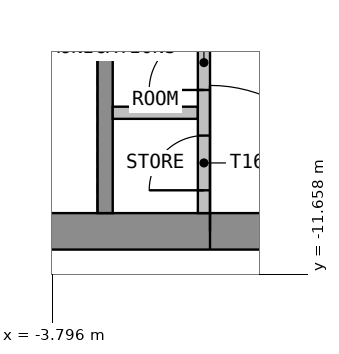
"""IFC4 building model, lengths in metres.
Left out: names, types, materials, properties, quantities, classifications, styles, units other than length and angle.
Written with IfcOpenShell. Run it as: python <this file> out.ifc"""

import sys

from ifc_helpers import new_model, si_unit, direction, frame, frame_2d, origin, place, context, subcontext, project, spatial, rectangle, extrude, element, fill, save


model = new_model("IFC4")
c1 = context("Model", 3, precision=1e-05, world=origin(), true_north=direction((0.0, 1.0)))
c2 = subcontext(c1, "Body", "Model", "MODEL_VIEW")
j1 = project(units=[si_unit("LENGTHUNIT", "METRE"), si_unit("PLANEANGLEUNIT", "RADIAN")], contexts=[c1])
p1 = place(None, origin())
s1 = spatial("IfcSite", under=j1, at=p1, CompositionType="ELEMENT")
p2 = place(p1, origin())
s2 = spatial("IfcBuilding", under=s1, at=p2, CompositionType="ELEMENT")
p3 = place(p2, frame((0.0, 0.0, 219.0)))
s3 = spatial("IfcBuildingStorey", under=s2, at=p3, CompositionType="ELEMENT", Elevation=219.0)
p4 = place(p3, frame((-13.5, -10.95, 0.0), z_axis=(0.0, 0.0, 1.0), x_axis=(1.0, 0.0, 0.0)))
e1 = element("IfcWall", 1, at=p4, inside=s3, PredefinedType="SHEAR", context=c2, shape_type="SweptSolid", body=[
    extrude(rectangle(XDim=27.0, YDim=0.6, at=frame_2d((13.5, 0.0))), origin(), (0.0, 0.0, 1.0), 3.55),
])
p5 = place(p4, frame((12.3, 0.0, 0.0)))
e2 = element("IfcOpeningElement", 2, at=p5, cuts=e1, PredefinedType="OPENING", context=c2, shape_type="SweptSolid", body=[
    extrude(rectangle(XDim=2.4, YDim=2.1, at=frame_2d((1.2, 1.05))), frame((0.0, 0.31, 0.0), z_axis=(0.0, -1.0, 0.0), x_axis=(1.0, 0.0, 0.0)), (0.0, 0.0, 1.0), 0.62),
])
p6 = place(p4, frame((1.05, 0.0, 0.0)))
e3 = element("IfcOpeningElement", 3, at=p6, cuts=e1, PredefinedType="OPENING", context=c2, shape_type="SweptSolid", body=[
    extrude(rectangle(XDim=1.2, YDim=2.1, at=frame_2d((0.6, 1.05))), frame((0.0, 0.31, 0.0), z_axis=(0.0, -1.0, 0.0), x_axis=(1.0, 0.0, 0.0)), (0.0, 0.0, 1.0), 0.62),
])
p7 = place(p4, frame((24.75, 0.0, 0.0)))
e4 = element("IfcOpeningElement", 4, at=p7, cuts=e1, PredefinedType="OPENING", context=c2, shape_type="SweptSolid", body=[
    extrude(rectangle(XDim=1.2, YDim=2.1, at=frame_2d((0.6, 1.05))), frame((0.0, 0.31, 0.0), z_axis=(0.0, -1.0, 0.0), x_axis=(1.0, 0.0, 0.0)), (0.0, 0.0, 1.0), 0.62),
])
p8 = place(p3, frame((-2.925, -10.65, 0.0), z_axis=(0.0, 0.0, 1.0), x_axis=(0.0, 1.0, 0.0)))
e5 = element("IfcWall", 5, at=p8, inside=s3, PredefinedType="SHEAR", context=c2, shape_type="SweptSolid", body=[
    extrude(rectangle(XDim=3.25, YDim=0.25, at=frame_2d((1.625, 0.0))), origin(), (0.0, 0.0, 1.0), 3.55),
])
p9 = place(p3, frame((-2.8, -9.0, 0.0), z_axis=(0.0, 0.0, 1.0), x_axis=(1.0, 0.0, 0.0)))
e6 = element("IfcWall", 6, at=p9, inside=s3, PredefinedType="PARTITIONING", context=c2, shape_type="SweptSolid", body=[
    extrude(rectangle(XDim=1.4, YDim=0.2, at=frame_2d((0.7, 0.0))), origin(), (0.0, 0.0, 1.0), 3.55),
])
p10 = place(p3, frame((-1.3, -10.65, 0.0), z_axis=(0.0, 0.0, 1.0), x_axis=(0.0, 1.0, 0.0)))
e7 = element("IfcWall", 7, at=p10, inside=s3, PredefinedType="PARTITIONING", context=c2, shape_type="SweptSolid", body=[
    extrude(rectangle(XDim=3.5, YDim=0.2, at=frame_2d((1.75, 0.0))), origin(), (0.0, 0.0, 1.0), 3.55),
])
p11 = place(p10, frame((0.375, 0.0, 0.0)))
e8 = element("IfcOpeningElement", 8, at=p11, cuts=e7, PredefinedType="OPENING", context=c2, shape_type="SweptSolid", body=[
    extrude(rectangle(XDim=0.9, YDim=2.1, at=frame_2d((0.45, 1.05))), frame((0.0, 0.11, 0.0), z_axis=(0.0, -1.0, 0.0), x_axis=(1.0, 0.0, 0.0)), (0.0, 0.0, 1.0), 0.22),
])
p12 = place(p10, frame((2.025, 0.0, 0.0)))
e9 = element("IfcOpeningElement", 9, at=p12, cuts=e7, PredefinedType="OPENING", context=c2, shape_type="SweptSolid", body=[
    extrude(rectangle(XDim=0.9, YDim=2.1, at=frame_2d((0.45, 1.05))), frame((0.0, 0.11, 0.0), z_axis=(0.0, -1.0, 0.0), x_axis=(1.0, 0.0, 0.0)), (0.0, 0.0, 1.0), 0.22),
])
p13 = place(p5, origin())
e10 = element("IfcDoor", 10, at=p13, inside=s3, OperationType="DOUBLE_DOOR_DOUBLE_SWING", PredefinedType="DOOR", context=c2, shape_type="SweptSolid", body=[
    extrude(rectangle(XDim=2.4, YDim=2.1, at=frame_2d((1.2, 1.05))), frame((0.0, 0.025, 0.0), z_axis=(0.0, -1.0, 0.0), x_axis=(1.0, 0.0, 0.0)), (0.0, 0.0, 1.0), 0.05),
])
fill(e2, e10)
p14 = place(p11, origin())
e11 = element("IfcDoor", 11, at=p14, inside=s3, OperationType="SINGLE_SWING_LEFT", PredefinedType="DOOR", context=c2, shape_type="SweptSolid", body=[
    extrude(rectangle(XDim=0.9, YDim=2.1, at=frame_2d((0.45, 1.05))), frame((0.0, 0.025, 0.0), z_axis=(0.0, -1.0, 0.0), x_axis=(1.0, 0.0, 0.0)), (0.0, 0.0, 1.0), 0.05),
])
fill(e8, e11)
p15 = place(p12, origin())
e12 = element("IfcDoor", 12, at=p15, inside=s3, OperationType="SINGLE_SWING_LEFT", PredefinedType="DOOR", context=c2, shape_type="SweptSolid", body=[
    extrude(rectangle(XDim=0.9, YDim=2.1, at=frame_2d((0.45, 1.05))), frame((0.0, 0.025, 0.0), z_axis=(0.0, -1.0, 0.0), x_axis=(1.0, 0.0, 0.0)), (0.0, 0.0, 1.0), 0.05),
])
fill(e9, e12)
save(model, sys.argv[1])
